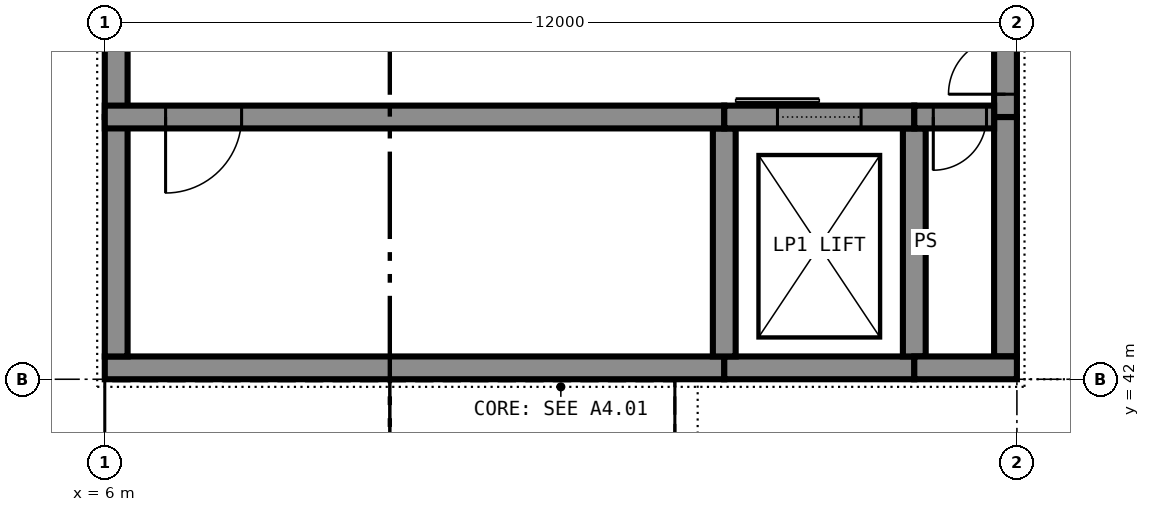
"""IFC4 building model, lengths in metres.
Left out: names, types, materials, properties, quantities, classifications, styles, units other than length and angle.
Written with IfcOpenShell. Run it as: python <this file> out.ifc"""

import sys

from ifc_helpers import new_model, si_unit, direction, frame, frame_2d, origin, place, context, subcontext, project, spatial, rectangle, extrude, element, fill, save


model = new_model("IFC4")
c1 = context("Model", 3, precision=1e-05, world=origin(), true_north=direction((0.0, 1.0)))
c2 = subcontext(c1, "Body", "Model", "MODEL_VIEW")
j1 = project(units=[si_unit("LENGTHUNIT", "METRE"), si_unit("PLANEANGLEUNIT", "RADIAN")], contexts=[c1])
p1 = place(None, origin())
s1 = spatial("IfcSite", under=j1, at=p1, CompositionType="ELEMENT")
p2 = place(p1, origin())
s2 = spatial("IfcBuilding", under=s1, at=p2, CompositionType="ELEMENT")
p3 = place(p2, frame((0.0, 0.0, -6.0)))
s3 = spatial("IfcBuildingStorey", under=s2, at=p3, CompositionType="ELEMENT", Elevation=-6.0)
p4 = place(p3, frame((6.0, 42.15, 0.0), z_axis=(0.0, 0.0, 1.0), x_axis=(1.0, 0.0, 0.0)))
e1 = element("IfcWall", 1, at=p4, inside=s3, PredefinedType="SHEAR", context=c2, shape_type="SweptSolid", body=[
    extrude(rectangle(XDim=8.15, YDim=0.3, at=frame_2d((4.075, 0.0))), origin(), (0.0, 0.0, 1.0), 5.7),
])
p5 = place(p3, frame((14.15, 42.15, 0.0), z_axis=(0.0, 0.0, 1.0), x_axis=(1.0, 0.0, 0.0)))
e2 = element("IfcWall", 2, at=p5, inside=s3, PredefinedType="SHEAR", context=c2, shape_type="SweptSolid", body=[
    extrude(rectangle(XDim=2.5, YDim=0.3, at=frame_2d((1.25, 0.0))), origin(), (0.0, 0.0, 1.0), 5.7),
])
p6 = place(p3, frame((16.65, 42.15, 0.0), z_axis=(0.0, 0.0, 1.0), x_axis=(1.0, 0.0, 0.0)))
e3 = element("IfcWall", 3, at=p6, inside=s3, PredefinedType="SHEAR", context=c2, shape_type="SweptSolid", body=[
    extrude(rectangle(XDim=1.35, YDim=0.3, at=frame_2d((0.675, 0.0))), origin(), (0.0, 0.0, 1.0), 5.7),
])
p7 = place(p3, frame((6.0, 45.45, 0.0), z_axis=(0.0, 0.0, 1.0), x_axis=(1.0, 0.0, 0.0)))
e4 = element("IfcWall", 4, at=p7, inside=s3, PredefinedType="SHEAR", context=c2, shape_type="SweptSolid", body=[
    extrude(rectangle(XDim=8.15, YDim=0.3, at=frame_2d((4.075, 0.0))), origin(), (0.0, 0.0, 1.0), 5.7),
])
p8 = place(p7, frame((0.8, 0.0, 0.0)))
e5 = element("IfcOpeningElement", 5, at=p8, cuts=e4, PredefinedType="OPENING", context=c2, shape_type="SweptSolid", body=[
    extrude(rectangle(XDim=1.0, YDim=2.1, at=frame_2d((0.5, 1.05))), frame((0.0, 0.16, 0.0), z_axis=(0.0, -1.0, 0.0), x_axis=(1.0, 0.0, 0.0)), (0.0, 0.0, 1.0), 0.32),
])
p9 = place(p3, frame((14.15, 45.45, 0.0), z_axis=(0.0, 0.0, 1.0), x_axis=(1.0, 0.0, 0.0)))
e6 = element("IfcWall", 6, at=p9, inside=s3, PredefinedType="SHEAR", context=c2, shape_type="SweptSolid", body=[
    extrude(rectangle(XDim=2.5, YDim=0.3, at=frame_2d((1.25, 0.0))), origin(), (0.0, 0.0, 1.0), 5.7),
])
p10 = place(p9, frame((0.7, 0.0, 0.0)))
e7 = element("IfcOpeningElement", 7, at=p10, cuts=e6, PredefinedType="OPENING", context=c2, shape_type="SweptSolid", body=[
    extrude(rectangle(XDim=1.1, YDim=2.1, at=frame_2d((0.55, 1.05))), frame((0.0, 0.16, 0.0), z_axis=(0.0, -1.0, 0.0), x_axis=(1.0, 0.0, 0.0)), (0.0, 0.0, 1.0), 0.32),
])
p11 = place(p3, frame((16.65, 45.45, 0.0), z_axis=(0.0, 0.0, 1.0), x_axis=(1.0, 0.0, 0.0)))
e8 = element("IfcWall", 8, at=p11, inside=s3, PredefinedType="SHEAR", context=c2, shape_type="SweptSolid", body=[
    extrude(rectangle(XDim=1.05, YDim=0.3, at=frame_2d((0.525, 0.0))), origin(), (0.0, 0.0, 1.0), 5.7),
])
p12 = place(p11, frame((0.25, 0.0, 0.0)))
e9 = element("IfcOpeningElement", 9, at=p12, cuts=e8, PredefinedType="OPENING", context=c2, shape_type="SweptSolid", body=[
    extrude(rectangle(XDim=0.7, YDim=2.1, at=frame_2d((0.35, 1.05))), frame((0.0, 0.16, 0.0), z_axis=(0.0, -1.0, 0.0), x_axis=(1.0, 0.0, 0.0)), (0.0, 0.0, 1.0), 0.32),
])
p13 = place(p3, frame((6.15, 42.3, 0.0), z_axis=(0.0, 0.0, 1.0), x_axis=(0.0, 1.0, 0.0)))
e10 = element("IfcWall", 10, at=p13, inside=s3, PredefinedType="SHEAR", context=c2, shape_type="SweptSolid", body=[
    extrude(rectangle(XDim=3.15, YDim=0.3, at=frame_2d((1.575, 0.0))), origin(), (0.0, 0.0, 1.0), 5.7),
])
p14 = place(p3, frame((6.15, 45.45, 0.0), z_axis=(0.0, 0.0, 1.0), x_axis=(0.0, 1.0, 0.0)))
e11 = element("IfcWall", 11, at=p14, inside=s3, PredefinedType="SHEAR", context=c2, shape_type="SweptSolid", body=[
    extrude(rectangle(XDim=5.1, YDim=0.3, at=frame_2d((2.55, 0.0))), origin(), (0.0, 0.0, 1.0), 5.7),
])
p15 = place(p3, frame((17.85, 42.3, 0.0), z_axis=(0.0, 0.0, 1.0), x_axis=(0.0, 1.0, 0.0)))
e12 = element("IfcWall", 12, at=p15, inside=s3, PredefinedType="SHEAR", context=c2, shape_type="SweptSolid", body=[
    extrude(rectangle(XDim=3.15, YDim=0.3, at=frame_2d((1.575, 0.0))), origin(), (0.0, 0.0, 1.0), 5.7),
])
p16 = place(p3, frame((17.85, 45.45, 0.0), z_axis=(0.0, 0.0, 1.0), x_axis=(0.0, 1.0, 0.0)))
e13 = element("IfcWall", 13, at=p16, inside=s3, PredefinedType="SHEAR", context=c2, shape_type="SweptSolid", body=[
    extrude(rectangle(XDim=5.1, YDim=0.3, at=frame_2d((2.55, 0.0))), origin(), (0.0, 0.0, 1.0), 5.7),
])
p17 = place(p16, frame((0.3, 0.0, 0.0)))
e14 = element("IfcOpeningElement", 14, at=p17, cuts=e13, PredefinedType="OPENING", context=c2, shape_type="SweptSolid", body=[
    extrude(rectangle(XDim=1.5, YDim=2.1, at=frame_2d((0.75, 1.05))), frame((0.0, 0.16, 0.0), z_axis=(0.0, -1.0, 0.0), x_axis=(1.0, 0.0, 0.0)), (0.0, 0.0, 1.0), 0.32),
])
for number, where, z_axis, x_axis in (
    (15, (14.15, 42.3, 0.0), (0.0, 0.0, 1.0), (0.0, 1.0, 0.0)),
    (16, (16.65, 42.3, 0.0), (0.0, 0.0, 1.0), (0.0, 1.0, 0.0)),
):
    element("IfcWall", number, at=place(p3, frame(where, z_axis=z_axis, x_axis=x_axis)), inside=s3, PredefinedType="SHEAR", context=c2, shape_type="SweptSolid", body=[
        extrude(rectangle(XDim=3.0, YDim=0.3, at=frame_2d((1.5, 0.0))), origin(), (0.0, 0.0, 1.0), 5.7),
    ])
p18 = place(p8, frame((1.0, 0.0, 0.0), z_axis=(0.0, 0.0, 1.0), x_axis=(-1.0, 0.0, 0.0)))
e17 = element("IfcDoor", 17, at=p18, inside=s3, OperationType="SINGLE_SWING_LEFT", PredefinedType="DOOR", context=c2, shape_type="SweptSolid", body=[
    extrude(rectangle(XDim=1.0, YDim=2.1, at=frame_2d((0.5, 1.05))), frame((0.0, 0.025, 0.0), z_axis=(0.0, -1.0, 0.0), x_axis=(1.0, 0.0, 0.0)), (0.0, 0.0, 1.0), 0.05),
])
fill(e5, e17)
p19 = place(p10, origin())
e18 = element("IfcDoor", 18, at=p19, inside=s3, OperationType="SLIDING_TO_LEFT", PredefinedType="DOOR", context=c2, shape_type="SweptSolid", body=[
    extrude(rectangle(XDim=1.1, YDim=2.1, at=frame_2d((0.55, 1.05))), frame((0.0, 0.025, 0.0), z_axis=(0.0, -1.0, 0.0), x_axis=(1.0, 0.0, 0.0)), (0.0, 0.0, 1.0), 0.05),
])
fill(e7, e18)
p20 = place(p12, frame((0.7, 0.0, 0.0), z_axis=(0.0, 0.0, 1.0), x_axis=(-1.0, 0.0, 0.0)))
e19 = element("IfcDoor", 19, at=p20, inside=s3, OperationType="SINGLE_SWING_LEFT", PredefinedType="DOOR", context=c2, shape_type="SweptSolid", body=[
    extrude(rectangle(XDim=0.7, YDim=2.1, at=frame_2d((0.35, 1.05))), frame((0.0, 0.025, 0.0), z_axis=(0.0, -1.0, 0.0), x_axis=(1.0, 0.0, 0.0)), (0.0, 0.0, 1.0), 0.05),
])
fill(e9, e19)
p21 = place(p17, origin())
e20 = element("IfcDoor", 20, at=p21, inside=s3, OperationType="DOUBLE_DOOR_SINGLE_SWING", PredefinedType="DOOR", context=c2, shape_type="SweptSolid", body=[
    extrude(rectangle(XDim=1.5, YDim=2.1, at=frame_2d((0.75, 1.05))), frame((0.0, 0.025, 0.0), z_axis=(0.0, -1.0, 0.0), x_axis=(1.0, 0.0, 0.0)), (0.0, 0.0, 1.0), 0.05),
])
fill(e14, e20)
save(model, sys.argv[1])
